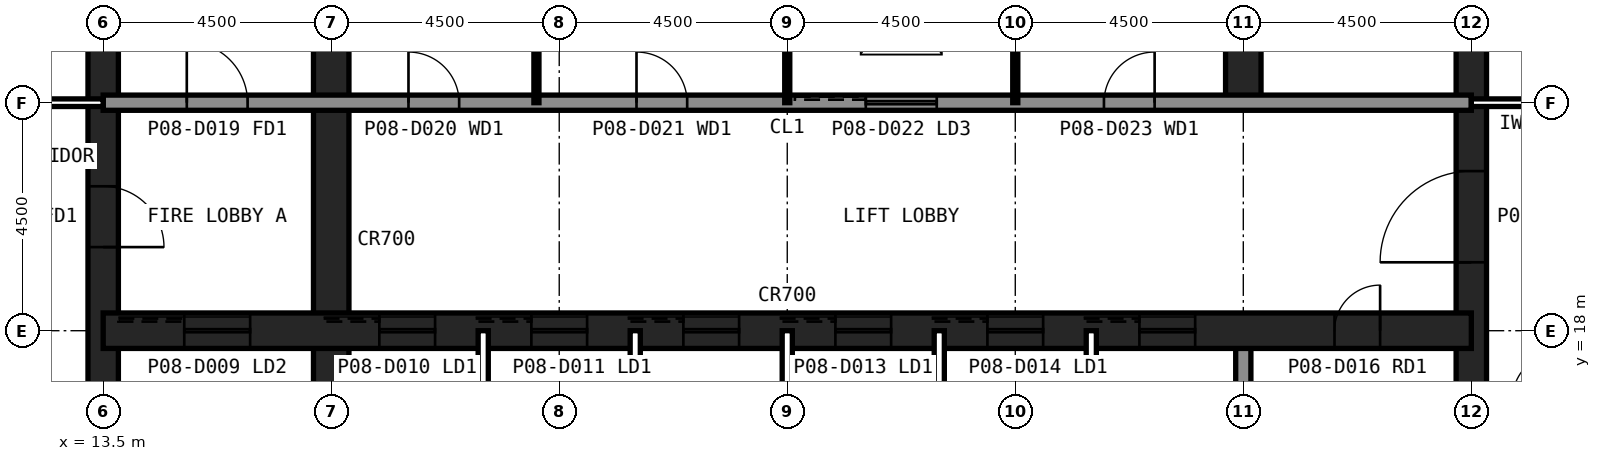
"""IFC4 building model, lengths in metres.
Left out: names, types, materials, properties, quantities, classifications, styles, units other than length and angle.
Written with IfcOpenShell. Run it as: python <this file> out.ifc"""

import sys

from ifc_helpers import new_model, si_unit, direction, frame, frame_2d, origin, place, context, subcontext, project, spatial, rectangle, extrude, element, fill, save


model = new_model("IFC4")
c1 = context("Model", 3, precision=1e-05, world=origin(), true_north=direction((0.0, 1.0)))
c2 = subcontext(c1, "Body", "Model", "MODEL_VIEW")
j1 = project(units=[si_unit("LENGTHUNIT", "METRE"), si_unit("PLANEANGLEUNIT", "RADIAN")], contexts=[c1])
p1 = place(None, origin())
s1 = spatial("IfcSite", under=j1, at=p1, CompositionType="ELEMENT")
p2 = place(p1, origin())
s2 = spatial("IfcBuilding", under=s1, at=p2, CompositionType="ELEMENT")
p3 = place(p2, frame((0.0, 0.0, 37.4)))
s3 = spatial("IfcBuildingStorey", under=s2, at=p3, CompositionType="ELEMENT", Elevation=37.4)
p4 = place(p3, frame((40.5, 13.5, 0.0), z_axis=(0.0, 0.0, 1.0), x_axis=(0.0, 1.0, 0.0)))
e1 = element("IfcWall", 1, at=p4, inside=s3, PredefinedType="SHEAR", context=c2, shape_type="SweptSolid", body=[
    extrude(rectangle(XDim=27.0, YDim=0.6, at=frame_2d((13.5, 0.0))), origin(), (0.0, 0.0, 1.0), 4.2),
])
p5 = place(p4, frame((5.85, 0.0, 0.0)))
e2 = element("IfcOpeningElement", 2, at=p5, cuts=e1, PredefinedType="OPENING", context=c2, shape_type="SweptSolid", body=[
    extrude(rectangle(XDim=1.8, YDim=2.1, at=frame_2d((0.9, 1.05))), frame((0.0, 0.31, 0.0), z_axis=(0.0, -1.0, 0.0), x_axis=(1.0, 0.0, 0.0)), (0.0, 0.0, 1.0), 0.62),
])
p6 = place(p4, frame((19.65, 0.0, 0.0)))
e3 = element("IfcOpeningElement", 3, at=p6, cuts=e1, PredefinedType="OPENING", context=c2, shape_type="SweptSolid", body=[
    extrude(rectangle(XDim=1.2, YDim=2.1, at=frame_2d((0.6, 1.05))), frame((0.0, 0.31, 0.0), z_axis=(0.0, -1.0, 0.0), x_axis=(1.0, 0.0, 0.0)), (0.0, 0.0, 1.0), 0.62),
])
p7 = place(p3, frame((13.5, 40.5, 0.0), z_axis=(0.0, 0.0, 1.0), x_axis=(0.0, -1.0, 0.0)))
e4 = element("IfcWall", 4, at=p7, inside=s3, PredefinedType="SHEAR", context=c2, shape_type="SweptSolid", body=[
    extrude(rectangle(XDim=27.0, YDim=0.6, at=frame_2d((13.5, 0.0))), origin(), (0.0, 0.0, 1.0), 4.2),
])
p8 = place(p7, frame((19.65, 0.0, 0.0)))
e5 = element("IfcOpeningElement", 5, at=p8, cuts=e4, PredefinedType="OPENING", context=c2, shape_type="SweptSolid", body=[
    extrude(rectangle(XDim=1.2, YDim=2.1, at=frame_2d((0.6, 1.05))), frame((0.0, 0.31, 0.0), z_axis=(0.0, -1.0, 0.0), x_axis=(1.0, 0.0, 0.0)), (0.0, 0.0, 1.0), 0.62),
])
p9 = place(p7, frame((5.85, 0.0, 0.0)))
e6 = element("IfcOpeningElement", 6, at=p9, cuts=e4, PredefinedType="OPENING", context=c2, shape_type="SweptSolid", body=[
    extrude(rectangle(XDim=1.8, YDim=2.1, at=frame_2d((0.9, 1.05))), frame((0.0, 0.31, 0.0), z_axis=(0.0, -1.0, 0.0), x_axis=(1.0, 0.0, 0.0)), (0.0, 0.0, 1.0), 0.62),
])
p10 = place(p3, frame((18.0, 13.5, 0.0), z_axis=(0.0, 0.0, 1.0), x_axis=(0.0, 1.0, 0.0)))
e7 = element("IfcWall", 7, at=p10, inside=s3, PredefinedType="SHEAR", context=c2, shape_type="SweptSolid", body=[
    extrude(rectangle(XDim=18.0, YDim=0.7, at=frame_2d((9.0, 0.0))), origin(), (0.0, 0.0, 1.0), 4.2),
])
p11 = place(p3, frame((36.0, 13.5, 0.0), z_axis=(0.0, 0.0, 1.0), x_axis=(0.0, 1.0, 0.0)))
e8 = element("IfcWall", 8, at=p11, inside=s3, PredefinedType="SOLIDWALL", context=c2, shape_type="SweptSolid", body=[
    extrude(rectangle(XDim=4.5, YDim=0.3, at=frame_2d((2.25, 0.0))), origin(), (0.0, 0.0, 1.0), 4.04),
])
p12 = place(p3, frame((36.0, 22.5, 0.0), z_axis=(0.0, 0.0, 1.0), x_axis=(0.0, 1.0, 0.0)))
e9 = element("IfcWall", 9, at=p12, inside=s3, PredefinedType="SHEAR", context=c2, shape_type="SweptSolid", body=[
    extrude(rectangle(XDim=18.0, YDim=0.7, at=frame_2d((9.0, 0.0))), origin(), (0.0, 0.0, 1.0), 4.2),
])
p13 = place(p3, frame((13.5, 18.0, 0.0), z_axis=(0.0, 0.0, 1.0), x_axis=(1.0, 0.0, 0.0)))
e10 = element("IfcWall", 10, at=p13, inside=s3, PredefinedType="SHEAR", context=c2, shape_type="SweptSolid", body=[
    extrude(rectangle(XDim=27.0, YDim=0.7, at=frame_2d((13.5, 0.0))), origin(), (0.0, 0.0, 1.0), 4.2),
])
p14 = place(p13, frame((24.3, 0.0, 0.0)))
e11 = element("IfcOpeningElement", 11, at=p14, cuts=e10, PredefinedType="OPENING", context=c2, shape_type="SweptSolid", body=[
    extrude(rectangle(XDim=0.9, YDim=2.1, at=frame_2d((0.45, 1.05))), frame((0.0, 0.36, 0.0), z_axis=(0.0, -1.0, 0.0), x_axis=(1.0, 0.0, 0.0)), (0.0, 0.0, 1.0), 0.72),
])
p15 = place(p13, frame((5.45, 0.0, 0.0)))
e12 = element("IfcOpeningElement", 12, at=p15, cuts=e10, PredefinedType="OPENING", context=c2, shape_type="SweptSolid", body=[
    extrude(rectangle(XDim=1.1, YDim=2.1, at=frame_2d((0.55, 1.05))), frame((0.0, 0.36, 0.0), z_axis=(0.0, -1.0, 0.0), x_axis=(1.0, 0.0, 0.0)), (0.0, 0.0, 1.0), 0.72),
])
p16 = place(p13, frame((8.45, 0.0, 0.0)))
e13 = element("IfcOpeningElement", 13, at=p16, cuts=e10, PredefinedType="OPENING", context=c2, shape_type="SweptSolid", body=[
    extrude(rectangle(XDim=1.1, YDim=2.1, at=frame_2d((0.55, 1.05))), frame((0.0, 0.36, 0.0), z_axis=(0.0, -1.0, 0.0), x_axis=(1.0, 0.0, 0.0)), (0.0, 0.0, 1.0), 0.72),
])
p17 = place(p13, frame((11.45, 0.0, 0.0)))
e14 = element("IfcOpeningElement", 14, at=p17, cuts=e10, PredefinedType="OPENING", context=c2, shape_type="SweptSolid", body=[
    extrude(rectangle(XDim=1.1, YDim=2.1, at=frame_2d((0.55, 1.05))), frame((0.0, 0.36, 0.0), z_axis=(0.0, -1.0, 0.0), x_axis=(1.0, 0.0, 0.0)), (0.0, 0.0, 1.0), 0.72),
])
p18 = place(p13, frame((14.45, 0.0, 0.0)))
e15 = element("IfcOpeningElement", 15, at=p18, cuts=e10, PredefinedType="OPENING", context=c2, shape_type="SweptSolid", body=[
    extrude(rectangle(XDim=1.1, YDim=2.1, at=frame_2d((0.55, 1.05))), frame((0.0, 0.36, 0.0), z_axis=(0.0, -1.0, 0.0), x_axis=(1.0, 0.0, 0.0)), (0.0, 0.0, 1.0), 0.72),
])
p19 = place(p13, frame((17.45, 0.0, 0.0)))
e16 = element("IfcOpeningElement", 16, at=p19, cuts=e10, PredefinedType="OPENING", context=c2, shape_type="SweptSolid", body=[
    extrude(rectangle(XDim=1.1, YDim=2.1, at=frame_2d((0.55, 1.05))), frame((0.0, 0.36, 0.0), z_axis=(0.0, -1.0, 0.0), x_axis=(1.0, 0.0, 0.0)), (0.0, 0.0, 1.0), 0.72),
])
p20 = place(p13, frame((20.45, 0.0, 0.0)))
e17 = element("IfcOpeningElement", 17, at=p20, cuts=e10, PredefinedType="OPENING", context=c2, shape_type="SweptSolid", body=[
    extrude(rectangle(XDim=1.1, YDim=2.1, at=frame_2d((0.55, 1.05))), frame((0.0, 0.36, 0.0), z_axis=(0.0, -1.0, 0.0), x_axis=(1.0, 0.0, 0.0)), (0.0, 0.0, 1.0), 0.72),
])
p21 = place(p13, frame((1.6, 0.0, 0.0)))
e18 = element("IfcOpeningElement", 18, at=p21, cuts=e10, PredefinedType="OPENING", context=c2, shape_type="SweptSolid", body=[
    extrude(rectangle(XDim=1.3, YDim=2.2, at=frame_2d((0.65, 1.1))), frame((0.0, 0.36, 0.0), z_axis=(0.0, -1.0, 0.0), x_axis=(1.0, 0.0, 0.0)), (0.0, 0.0, 1.0), 0.72),
])
p22 = place(p3, frame((13.5, 22.5, 0.0), z_axis=(0.0, 0.0, 1.0), x_axis=(1.0, 0.0, 0.0)))
e19 = element("IfcWall", 19, at=p22, inside=s3, PredefinedType="SOLIDWALL", context=c2, shape_type="SweptSolid", body=[
    extrude(rectangle(XDim=27.0, YDim=0.3, at=frame_2d((13.5, 0.0))), origin(), (0.0, 0.0, 1.0), 4.04),
])
p23 = place(p22, frame((1.65, 0.0, 0.0)))
e20 = element("IfcOpeningElement", 20, at=p23, cuts=e19, PredefinedType="OPENING", context=c2, shape_type="SweptSolid", body=[
    extrude(rectangle(XDim=1.2, YDim=2.1, at=frame_2d((0.6, 1.05))), frame((0.0, 0.16, 0.0), z_axis=(0.0, -1.0, 0.0), x_axis=(1.0, 0.0, 0.0)), (0.0, 0.0, 1.0), 0.32),
])
p24 = place(p22, frame((6.025, 0.0, 0.0)))
e21 = element("IfcOpeningElement", 21, at=p24, cuts=e19, PredefinedType="OPENING", context=c2, shape_type="SweptSolid", body=[
    extrude(rectangle(XDim=1.0, YDim=2.1, at=frame_2d((0.5, 1.05))), frame((0.0, 0.16, 0.0), z_axis=(0.0, -1.0, 0.0), x_axis=(1.0, 0.0, 0.0)), (0.0, 0.0, 1.0), 0.32),
])
p25 = place(p22, frame((10.525, 0.0, 0.0)))
e22 = element("IfcOpeningElement", 22, at=p25, cuts=e19, PredefinedType="OPENING", context=c2, shape_type="SweptSolid", body=[
    extrude(rectangle(XDim=1.0, YDim=2.1, at=frame_2d((0.5, 1.05))), frame((0.0, 0.16, 0.0), z_axis=(0.0, -1.0, 0.0), x_axis=(1.0, 0.0, 0.0)), (0.0, 0.0, 1.0), 0.32),
])
p26 = place(p22, frame((19.75, 0.0, 0.0)))
e23 = element("IfcOpeningElement", 23, at=p26, cuts=e19, PredefinedType="OPENING", context=c2, shape_type="SweptSolid", body=[
    extrude(rectangle(XDim=1.0, YDim=2.1, at=frame_2d((0.5, 1.05))), frame((0.0, 0.16, 0.0), z_axis=(0.0, -1.0, 0.0), x_axis=(1.0, 0.0, 0.0)), (0.0, 0.0, 1.0), 0.32),
])
p27 = place(p22, frame((15.05, 0.0, 0.0)))
e24 = element("IfcOpeningElement", 24, at=p27, cuts=e19, PredefinedType="OPENING", context=c2, shape_type="SweptSolid", body=[
    extrude(rectangle(XDim=1.4, YDim=2.4, at=frame_2d((0.7, 1.2))), frame((0.0, 0.16, 0.0), z_axis=(0.0, -1.0, 0.0), x_axis=(1.0, 0.0, 0.0)), (0.0, 0.0, 1.0), 0.32),
])
for number, where, z_axis, x_axis in (
    (25, (21.0, 13.5, 0.0), (0.0, 0.0, 1.0), (0.0, 1.0, 0.0)),
    (26, (24.0, 13.5, 0.0), (0.0, 0.0, 1.0), (0.0, 1.0, 0.0)),
    (27, (27.0, 13.5, 0.0), (0.0, 0.0, 1.0), (0.0, 1.0, 0.0)),
    (28, (30.0, 13.5, 0.0), (0.0, 0.0, 1.0), (0.0, 1.0, 0.0)),
    (29, (33.0, 13.5, 0.0), (0.0, 0.0, 1.0), (0.0, 1.0, 0.0)),
):
    element("IfcWall", number, at=place(p3, frame(where, z_axis=z_axis, x_axis=x_axis)), inside=s3, PredefinedType="PARTITIONING", context=c2, shape_type="SweptSolid", body=[
        extrude(rectangle(XDim=4.5, YDim=0.2, at=frame_2d((2.25, 0.0))), origin(), (0.0, 0.0, 1.0), 4.04),
    ])
for number, where, z_axis, x_axis in (
    (30, (22.05, 22.5, 0.0), (0.0, 0.0, 1.0), (0.0, 1.0, 0.0)),
    (31, (27.0, 22.5, 0.0), (0.0, 0.0, 1.0), (0.0, 1.0, 0.0)),
    (32, (31.5, 22.5, 0.0), (0.0, 0.0, 1.0), (0.0, 1.0, 0.0)),
):
    element("IfcWall", number, at=place(p3, frame(where, z_axis=z_axis, x_axis=x_axis)), inside=s3, PredefinedType="PLUMBINGWALL", context=c2, shape_type="SweptSolid", body=[
        extrude(rectangle(XDim=9.0, YDim=0.1, at=frame_2d((4.5, 0.0))), origin(), (0.0, 0.0, 1.0), 4.04),
    ])
p28 = place(p3, frame((42.3, 22.5, 0.0), z_axis=(0.0, 0.0, 1.0), x_axis=(-1.0, 0.0, 0.0)))
e33 = element("IfcWall", 33, at=p28, inside=s3, PredefinedType="PARTITIONING", context=c2, shape_type="SweptSolid", body=[
    extrude(rectangle(XDim=1.8, YDim=0.15, at=frame_2d((0.9, 0.0))), origin(), (0.0, 0.0, 1.0), 3.189),
])
p29 = place(p3, frame((9.0, 22.5, 0.0), z_axis=(0.0, 0.0, 1.0), x_axis=(1.0, 0.0, 0.0)))
e34 = element("IfcWall", 34, at=p29, inside=s3, PredefinedType="PARTITIONING", context=c2, shape_type="SweptSolid", body=[
    extrude(rectangle(XDim=4.5, YDim=0.15, at=frame_2d((2.25, 0.0))), origin(), (0.0, 0.0, 1.0), 3.189),
])
p30 = place(p8, origin())
e35 = element("IfcDoor", 35, at=p30, inside=s3, OperationType="SINGLE_SWING_RIGHT", PredefinedType="DOOR", context=c2, shape_type="SweptSolid", body=[
    extrude(rectangle(XDim=1.2, YDim=2.1, at=frame_2d((0.6, 1.05))), frame((0.0, 0.025, 0.0), z_axis=(0.0, -1.0, 0.0), x_axis=(1.0, 0.0, 0.0)), (0.0, 0.0, 1.0), 0.05),
])
fill(e5, e35)
p31 = place(p5, origin())
e36 = element("IfcDoor", 36, at=p31, inside=s3, OperationType="SINGLE_SWING_LEFT", PredefinedType="DOOR", context=c2, shape_type="SweptSolid", body=[
    extrude(rectangle(XDim=1.8, YDim=2.1, at=frame_2d((0.9, 1.05))), frame((0.0, 0.025, 0.0), z_axis=(0.0, -1.0, 0.0), x_axis=(1.0, 0.0, 0.0)), (0.0, 0.0, 1.0), 0.05),
])
fill(e2, e36)
p32 = place(p23, origin())
e37 = element("IfcDoor", 37, at=p32, inside=s3, OperationType="SINGLE_SWING_LEFT", PredefinedType="DOOR", context=c2, shape_type="SweptSolid", body=[
    extrude(rectangle(XDim=1.2, YDim=2.1, at=frame_2d((0.6, 1.05))), frame((0.0, 0.025, 0.0), z_axis=(0.0, -1.0, 0.0), x_axis=(1.0, 0.0, 0.0)), (0.0, 0.0, 1.0), 0.05),
])
fill(e20, e37)
p33 = place(p24, origin())
e38 = element("IfcDoor", 38, at=p33, inside=s3, OperationType="SINGLE_SWING_LEFT", PredefinedType="DOOR", context=c2, shape_type="SweptSolid", body=[
    extrude(rectangle(XDim=1.0, YDim=2.1, at=frame_2d((0.5, 1.05))), frame((0.0, 0.025, 0.0), z_axis=(0.0, -1.0, 0.0), x_axis=(1.0, 0.0, 0.0)), (0.0, 0.0, 1.0), 0.05),
])
fill(e21, e38)
p34 = place(p25, origin())
e39 = element("IfcDoor", 39, at=p34, inside=s3, OperationType="SINGLE_SWING_LEFT", PredefinedType="DOOR", context=c2, shape_type="SweptSolid", body=[
    extrude(rectangle(XDim=1.0, YDim=2.1, at=frame_2d((0.5, 1.05))), frame((0.0, 0.025, 0.0), z_axis=(0.0, -1.0, 0.0), x_axis=(1.0, 0.0, 0.0)), (0.0, 0.0, 1.0), 0.05),
])
fill(e22, e39)
p35 = place(p26, origin())
e40 = element("IfcDoor", 40, at=p35, inside=s3, OperationType="SINGLE_SWING_RIGHT", PredefinedType="DOOR", context=c2, shape_type="SweptSolid", body=[
    extrude(rectangle(XDim=1.0, YDim=2.1, at=frame_2d((0.5, 1.05))), frame((0.0, 0.025, 0.0), z_axis=(0.0, -1.0, 0.0), x_axis=(1.0, 0.0, 0.0)), (0.0, 0.0, 1.0), 0.05),
])
fill(e23, e40)
p36 = place(p14, origin())
e41 = element("IfcDoor", 41, at=p36, inside=s3, OperationType="SINGLE_SWING_RIGHT", PredefinedType="DOOR", context=c2, shape_type="SweptSolid", body=[
    extrude(rectangle(XDim=0.9, YDim=2.1, at=frame_2d((0.45, 1.05))), frame((0.0, 0.025, 0.0), z_axis=(0.0, -1.0, 0.0), x_axis=(1.0, 0.0, 0.0)), (0.0, 0.0, 1.0), 0.05),
])
fill(e11, e41)
p37 = place(p15, origin())
e42 = element("IfcDoor", 42, at=p37, inside=s3, OperationType="SLIDING_TO_LEFT", PredefinedType="DOOR", context=c2, shape_type="SweptSolid", body=[
    extrude(rectangle(XDim=1.1, YDim=2.1, at=frame_2d((0.55, 1.05))), frame((0.0, 0.025, 0.0), z_axis=(0.0, -1.0, 0.0), x_axis=(1.0, 0.0, 0.0)), (0.0, 0.0, 1.0), 0.05),
])
fill(e12, e42)
p38 = place(p16, origin())
e43 = element("IfcDoor", 43, at=p38, inside=s3, OperationType="SLIDING_TO_LEFT", PredefinedType="DOOR", context=c2, shape_type="SweptSolid", body=[
    extrude(rectangle(XDim=1.1, YDim=2.1, at=frame_2d((0.55, 1.05))), frame((0.0, 0.025, 0.0), z_axis=(0.0, -1.0, 0.0), x_axis=(1.0, 0.0, 0.0)), (0.0, 0.0, 1.0), 0.05),
])
fill(e13, e43)
p39 = place(p17, origin())
e44 = element("IfcDoor", 44, at=p39, inside=s3, OperationType="SLIDING_TO_LEFT", PredefinedType="DOOR", context=c2, shape_type="SweptSolid", body=[
    extrude(rectangle(XDim=1.1, YDim=2.1, at=frame_2d((0.55, 1.05))), frame((0.0, 0.025, 0.0), z_axis=(0.0, -1.0, 0.0), x_axis=(1.0, 0.0, 0.0)), (0.0, 0.0, 1.0), 0.05),
])
fill(e14, e44)
p40 = place(p18, origin())
e45 = element("IfcDoor", 45, at=p40, inside=s3, OperationType="SLIDING_TO_LEFT", PredefinedType="DOOR", context=c2, shape_type="SweptSolid", body=[
    extrude(rectangle(XDim=1.1, YDim=2.1, at=frame_2d((0.55, 1.05))), frame((0.0, 0.025, 0.0), z_axis=(0.0, -1.0, 0.0), x_axis=(1.0, 0.0, 0.0)), (0.0, 0.0, 1.0), 0.05),
])
fill(e15, e45)
p41 = place(p19, origin())
e46 = element("IfcDoor", 46, at=p41, inside=s3, OperationType="SLIDING_TO_LEFT", PredefinedType="DOOR", context=c2, shape_type="SweptSolid", body=[
    extrude(rectangle(XDim=1.1, YDim=2.1, at=frame_2d((0.55, 1.05))), frame((0.0, 0.025, 0.0), z_axis=(0.0, -1.0, 0.0), x_axis=(1.0, 0.0, 0.0)), (0.0, 0.0, 1.0), 0.05),
])
fill(e16, e46)
p42 = place(p20, origin())
e47 = element("IfcDoor", 47, at=p42, inside=s3, OperationType="SLIDING_TO_LEFT", PredefinedType="DOOR", context=c2, shape_type="SweptSolid", body=[
    extrude(rectangle(XDim=1.1, YDim=2.1, at=frame_2d((0.55, 1.05))), frame((0.0, 0.025, 0.0), z_axis=(0.0, -1.0, 0.0), x_axis=(1.0, 0.0, 0.0)), (0.0, 0.0, 1.0), 0.05),
])
fill(e17, e47)
p43 = place(p21, origin())
e48 = element("IfcDoor", 48, at=p43, inside=s3, OperationType="SLIDING_TO_LEFT", PredefinedType="DOOR", context=c2, shape_type="SweptSolid", body=[
    extrude(rectangle(XDim=1.3, YDim=2.2, at=frame_2d((0.65, 1.1))), frame((0.0, 0.025, 0.0), z_axis=(0.0, -1.0, 0.0), x_axis=(1.0, 0.0, 0.0)), (0.0, 0.0, 1.0), 0.05),
])
fill(e18, e48)
p44 = place(p27, origin())
e49 = element("IfcDoor", 49, at=p44, inside=s3, OperationType="SLIDING_TO_LEFT", PredefinedType="DOOR", context=c2, shape_type="SweptSolid", body=[
    extrude(rectangle(XDim=1.4, YDim=2.4, at=frame_2d((0.7, 1.2))), frame((0.0, 0.025, 0.0), z_axis=(0.0, -1.0, 0.0), x_axis=(1.0, 0.0, 0.0)), (0.0, 0.0, 1.0), 0.05),
])
fill(e24, e49)
save(model, sys.argv[1])
